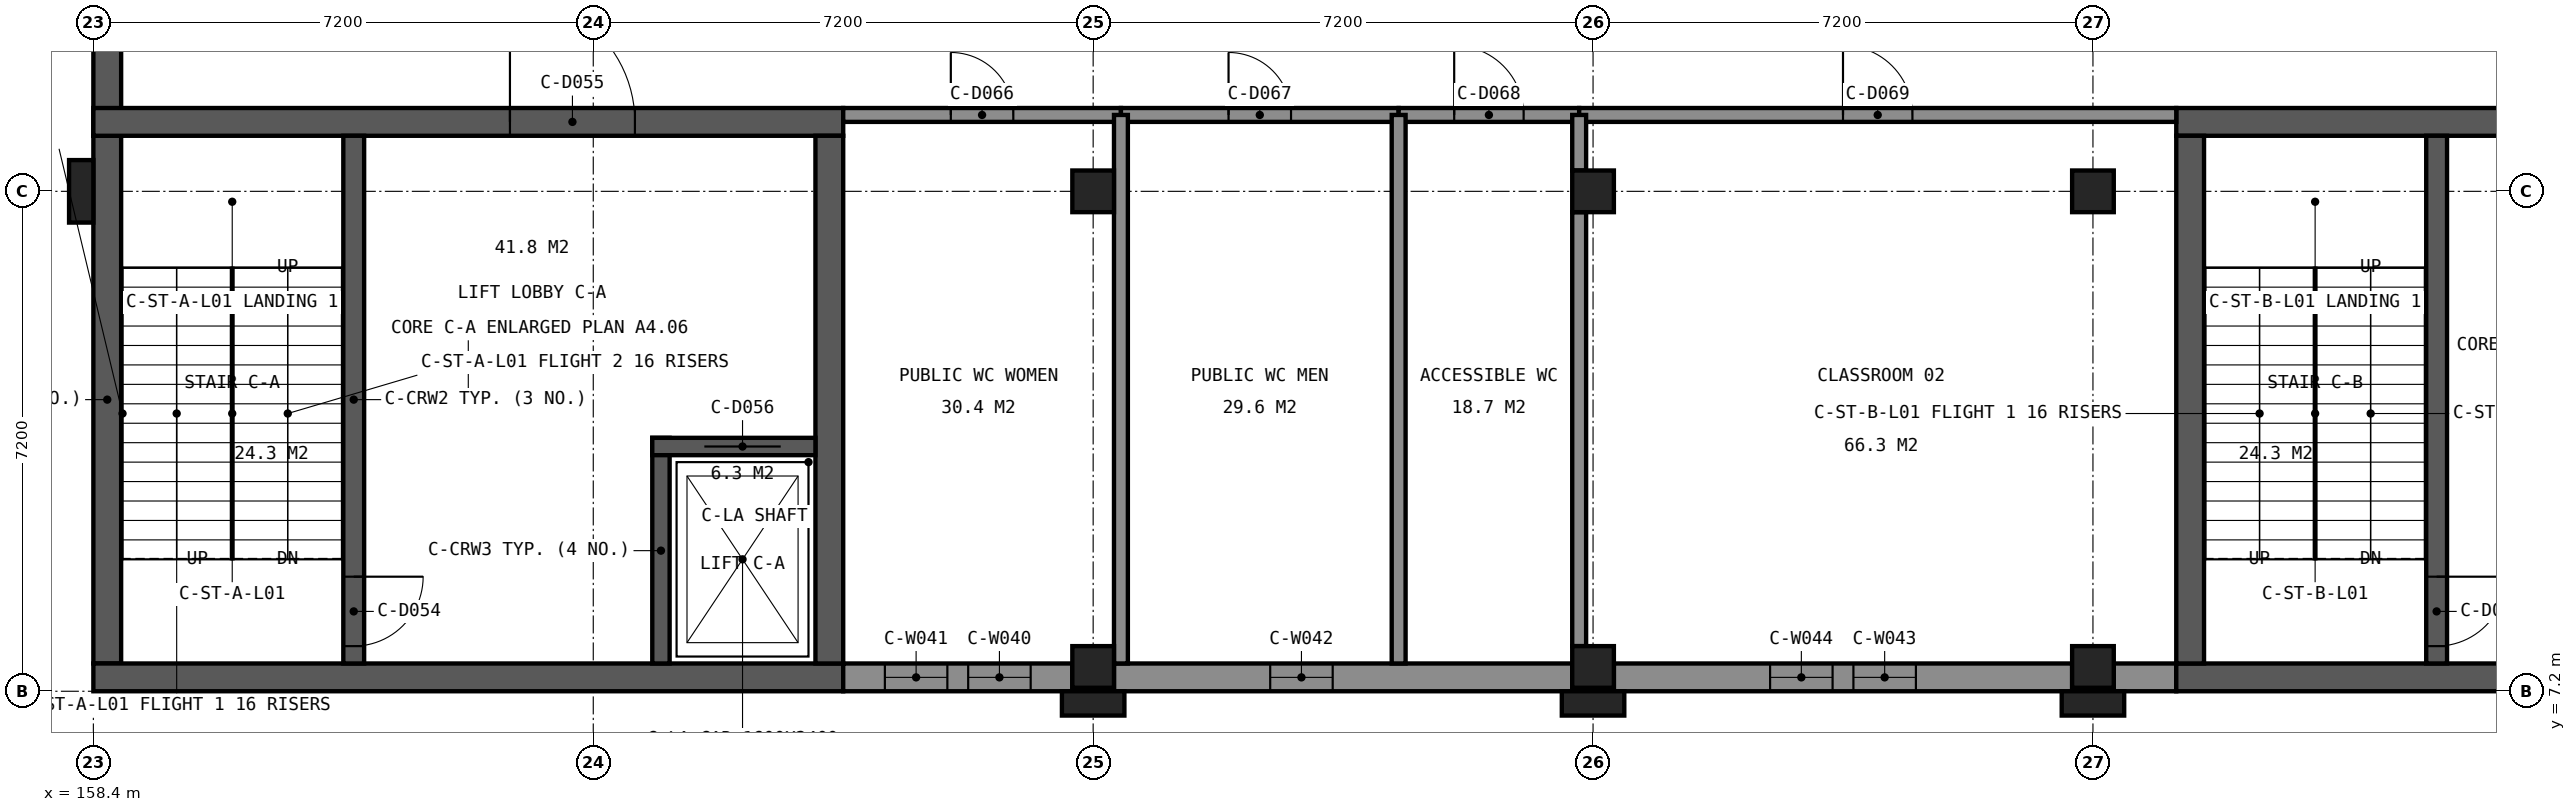
"""IFC4 building model, lengths in metres.
Left out: names, types, materials, properties, quantities, classifications, styles, units other than length and angle.
Written with IfcOpenShell. Run it as: python <this file> out.ifc"""

import sys

from ifc_helpers import new_model, si_unit, direction, frame, frame_2d, origin, origin_2d, place, context, subcontext, project, spatial, rectangle, extrude, element, fill, save


model = new_model("IFC4")
c1 = context("Model", 3, precision=1e-05, world=origin(), true_north=direction((0.0, 1.0)))
c2 = subcontext(c1, "Body", "Model", "MODEL_VIEW")
j1 = project(units=[si_unit("LENGTHUNIT", "METRE"), si_unit("PLANEANGLEUNIT", "RADIAN")], contexts=[c1])
p1 = place(None, origin())
s1 = spatial("IfcSite", under=j1, at=p1, CompositionType="ELEMENT")
p2 = place(p1, origin())
s2 = spatial("IfcBuilding", under=s1, at=p2, CompositionType="ELEMENT")
p3 = place(p2, frame((0.0, 0.0, 9.6)))
s3 = spatial("IfcBuildingStorey", under=s2, at=p3, CompositionType="ELEMENT", Elevation=9.6)
for number, where, z_axis, x_axis in (
    (1, (172.8, 14.4, 0.0), (0.0, 0.0, 1.0), (1.0, 0.0, 0.0)),
    (2, (180.0, 14.4, 0.0), (0.0, 0.0, 1.0), (1.0, 0.0, 0.0)),
    (3, (187.2, 14.4, 0.0), (0.0, 0.0, 1.0), (1.0, 0.0, 0.0)),
    (4, (172.8, 7.55, 0.0), (0.0, 0.0, 1.0), (1.0, 0.0, 0.0)),
    (5, (180.0, 7.55, 0.0), (0.0, 0.0, 1.0), (1.0, 0.0, 0.0)),
    (6, (187.2, 7.55, 0.0), (0.0, 0.0, 1.0), (1.0, 0.0, 0.0)),
):
    element("IfcColumn", number, at=place(p3, frame(where, z_axis=z_axis, x_axis=x_axis)), inside=s3, PredefinedType="COLUMN", context=c2, shape_type="SweptSolid", body=[
        extrude(rectangle(XDim=0.6, YDim=0.6, at=origin_2d()), origin(), (0.0, 0.0, 1.0), 4.8),
    ])
p4 = place(p3, frame((158.6, 15.2, 0.0), z_axis=(0.0, 0.0, 1.0), x_axis=(0.0, 1.0, 0.0)))
e7 = element("IfcWall", 7, at=p4, inside=s3, PredefinedType="SHEAR", context=c2, shape_type="SweptSolid", body=[
    extrude(rectangle(XDim=6.1, YDim=0.4, at=frame_2d((3.05, 0.0))), origin(), (0.0, 0.0, 1.0), 3.95),
])
p5 = place(p4, frame((2.0, 0.0, 0.9)))
e8 = element("IfcOpeningElement", 8, at=p5, cuts=e7, PredefinedType="OPENING", context=c2, shape_type="SweptSolid", body=[
    extrude(rectangle(XDim=0.9, YDim=2.7, at=frame_2d((0.45, 1.35))), frame((0.0, 0.21, 0.0), z_axis=(0.0, -1.0, 0.0), x_axis=(1.0, 0.0, 0.0)), (0.0, 0.0, 1.0), 0.42),
])
p6 = place(p3, frame((158.6, 7.6, 0.0), z_axis=(0.0, 0.0, 1.0), x_axis=(0.0, 1.0, 0.0)))
e9 = element("IfcWall", 9, at=p6, inside=s3, PredefinedType="SHEAR", context=c2, shape_type="SweptSolid", body=[
    extrude(rectangle(XDim=7.6, YDim=0.4, at=frame_2d((3.8, 0.0))), origin(), (0.0, 0.0, 1.0), 4.55),
])
p7 = place(p3, frame((169.2, 7.4, 0.0), z_axis=(0.0, 0.0, 1.0), x_axis=(-1.0, 0.0, 0.0)))
e10 = element("IfcWall", 10, at=p7, inside=s3, PredefinedType="SHEAR", context=c2, shape_type="SweptSolid", body=[
    extrude(rectangle(XDim=10.8, YDim=0.4, at=frame_2d((5.4, 0.0))), origin(), (0.0, 0.0, 1.0), 4.55),
])
p8 = place(p3, frame((172.5, 7.4, 0.0), z_axis=(0.0, 0.0, 1.0), x_axis=(-1.0, 0.0, 0.0)))
e11 = element("IfcWall", 11, at=p8, inside=s3, PredefinedType="SOLIDWALL", context=c2, shape_type="SweptSolid", body=[
    extrude(rectangle(XDim=3.3, YDim=0.4, at=frame_2d((1.65, 0.0))), origin(), (0.0, 0.0, 1.0), 3.95),
])
p9 = place(p8, frame((0.6, 0.0, 0.9)))
e12 = element("IfcOpeningElement", 12, at=p9, cuts=e11, PredefinedType="OPENING", context=c2, shape_type="SweptSolid", body=[
    extrude(rectangle(XDim=0.9, YDim=2.7, at=frame_2d((0.45, 1.35))), frame((0.0, 0.21, 0.0), z_axis=(0.0, -1.0, 0.0), x_axis=(1.0, 0.0, 0.0)), (0.0, 0.0, 1.0), 0.42),
])
p10 = place(p8, frame((1.8, 0.0, 0.9)))
e13 = element("IfcOpeningElement", 13, at=p10, cuts=e11, PredefinedType="OPENING", context=c2, shape_type="SweptSolid", body=[
    extrude(rectangle(XDim=0.9, YDim=2.7, at=frame_2d((0.45, 1.35))), frame((0.0, 0.21, 0.0), z_axis=(0.0, -1.0, 0.0), x_axis=(1.0, 0.0, 0.0)), (0.0, 0.0, 1.0), 0.42),
])
p11 = place(p3, frame((179.7, 7.4, 0.0), z_axis=(0.0, 0.0, 1.0), x_axis=(-1.0, 0.0, 0.0)))
e14 = element("IfcWall", 14, at=p11, inside=s3, PredefinedType="SOLIDWALL", context=c2, shape_type="SweptSolid", body=[
    extrude(rectangle(XDim=6.6, YDim=0.4, at=frame_2d((3.3, 0.0))), origin(), (0.0, 0.0, 1.0), 3.95),
])
p12 = place(p11, frame((3.45, 0.0, 0.9)))
e15 = element("IfcOpeningElement", 15, at=p12, cuts=e14, PredefinedType="OPENING", context=c2, shape_type="SweptSolid", body=[
    extrude(rectangle(XDim=0.9, YDim=2.7, at=frame_2d((0.45, 1.35))), frame((0.0, 0.21, 0.0), z_axis=(0.0, -1.0, 0.0), x_axis=(1.0, 0.0, 0.0)), (0.0, 0.0, 1.0), 0.42),
])
p13 = place(p3, frame((186.9, 7.4, 0.0), z_axis=(0.0, 0.0, 1.0), x_axis=(-1.0, 0.0, 0.0)))
e16 = element("IfcWall", 16, at=p13, inside=s3, PredefinedType="SOLIDWALL", context=c2, shape_type="SweptSolid", body=[
    extrude(rectangle(XDim=6.6, YDim=0.4, at=frame_2d((3.3, 0.0))), origin(), (0.0, 0.0, 1.0), 3.95),
])
p14 = place(p13, frame((2.25, 0.0, 0.9)))
e17 = element("IfcOpeningElement", 17, at=p14, cuts=e16, PredefinedType="OPENING", context=c2, shape_type="SweptSolid", body=[
    extrude(rectangle(XDim=0.9, YDim=2.7, at=frame_2d((0.45, 1.35))), frame((0.0, 0.21, 0.0), z_axis=(0.0, -1.0, 0.0), x_axis=(1.0, 0.0, 0.0)), (0.0, 0.0, 1.0), 0.42),
])
p15 = place(p13, frame((3.45, 0.0, 0.9)))
e18 = element("IfcOpeningElement", 18, at=p15, cuts=e16, PredefinedType="OPENING", context=c2, shape_type="SweptSolid", body=[
    extrude(rectangle(XDim=0.9, YDim=2.7, at=frame_2d((0.45, 1.35))), frame((0.0, 0.21, 0.0), z_axis=(0.0, -1.0, 0.0), x_axis=(1.0, 0.0, 0.0)), (0.0, 0.0, 1.0), 0.42),
])
p16 = place(p3, frame((188.4, 7.4, 0.0), z_axis=(0.0, 0.0, 1.0), x_axis=(-1.0, 0.0, 0.0)))
e19 = element("IfcWall", 19, at=p16, inside=s3, PredefinedType="SOLIDWALL", context=c2, shape_type="SweptSolid", body=[
    extrude(rectangle(XDim=0.9, YDim=0.4, at=frame_2d((0.45, 0.0))), origin(), (0.0, 0.0, 1.0), 3.95),
])
p17 = place(p3, frame((199.2, 7.4, 0.0), z_axis=(0.0, 0.0, 1.0), x_axis=(-1.0, 0.0, 0.0)))
e20 = element("IfcWall", 20, at=p17, inside=s3, PredefinedType="SHEAR", context=c2, shape_type="SweptSolid", body=[
    extrude(rectangle(XDim=10.8, YDim=0.4, at=frame_2d((5.4, 0.0))), origin(), (0.0, 0.0, 1.0), 4.55),
])
p18 = place(p3, frame((158.4, 15.4, 0.0), z_axis=(0.0, 0.0, 1.0), x_axis=(1.0, 0.0, 0.0)))
e21 = element("IfcWall", 21, at=p18, inside=s3, PredefinedType="SHEAR", context=c2, shape_type="SweptSolid", body=[
    extrude(rectangle(XDim=10.8, YDim=0.4, at=frame_2d((5.4, 0.0))), origin(), (0.0, 0.0, 1.0), 4.55),
])
p19 = place(p18, frame((6.0, 0.0, 0.0)))
e22 = element("IfcOpeningElement", 22, at=p19, cuts=e21, PredefinedType="OPENING", context=c2, shape_type="SweptSolid", body=[
    extrude(rectangle(XDim=1.8, YDim=2.1, at=frame_2d((0.9, 1.05))), frame((0.0, 0.21, 0.0), z_axis=(0.0, -1.0, 0.0), x_axis=(1.0, 0.0, 0.0)), (0.0, 0.0, 1.0), 0.42),
])
p20 = place(p3, frame((169.0, 15.2, 0.0), z_axis=(0.0, 0.0, 1.0), x_axis=(0.0, -1.0, 0.0)))
e23 = element("IfcWall", 23, at=p20, inside=s3, PredefinedType="SHEAR", context=c2, shape_type="SweptSolid", body=[
    extrude(rectangle(XDim=7.6, YDim=0.4, at=frame_2d((3.8, 0.0))), origin(), (0.0, 0.0, 1.0), 4.55),
])
p21 = place(p3, frame((162.15, 15.2, 0.0), z_axis=(0.0, 0.0, 1.0), x_axis=(0.0, -1.0, 0.0)))
e24 = element("IfcWall", 24, at=p21, inside=s3, PredefinedType="SHEAR", context=c2, shape_type="SweptSolid", body=[
    extrude(rectangle(XDim=7.6, YDim=0.3, at=frame_2d((3.8, 0.0))), origin(), (0.0, 0.0, 1.0), 4.55),
])
p22 = place(p21, frame((6.35, 0.0, 0.0)))
e25 = element("IfcOpeningElement", 25, at=p22, cuts=e24, PredefinedType="OPENING", context=c2, shape_type="SweptSolid", body=[
    extrude(rectangle(XDim=1.0, YDim=2.1, at=frame_2d((0.5, 1.05))), frame((0.0, 0.16, 0.0), z_axis=(0.0, -1.0, 0.0), x_axis=(1.0, 0.0, 0.0)), (0.0, 0.0, 1.0), 0.32),
])
p23 = place(p3, frame((166.575, 10.85, 0.0), z_axis=(0.0, 0.0, 1.0), x_axis=(0.0, -1.0, 0.0)))
e26 = element("IfcWall", 26, at=p23, inside=s3, PredefinedType="SHEAR", context=c2, shape_type="SweptSolid", body=[
    extrude(rectangle(XDim=3.25, YDim=0.25, at=frame_2d((1.625, 0.0))), origin(), (0.0, 0.0, 1.0), 4.55),
])
p24 = place(p3, frame((166.45, 10.725, 0.0), z_axis=(0.0, 0.0, 1.0), x_axis=(1.0, 0.0, 0.0)))
e27 = element("IfcWall", 27, at=p24, inside=s3, PredefinedType="SHEAR", context=c2, shape_type="SweptSolid", body=[
    extrude(rectangle(XDim=2.35, YDim=0.25, at=frame_2d((1.175, 0.0))), origin(), (0.0, 0.0, 1.0), 4.55),
])
p25 = place(p24, frame((0.75, 0.0, 0.0)))
e28 = element("IfcOpeningElement", 28, at=p25, cuts=e27, PredefinedType="OPENING", context=c2, shape_type="SweptSolid", body=[
    extrude(rectangle(XDim=1.1, YDim=2.1, at=frame_2d((0.55, 1.05))), frame((0.0, 0.135, 0.0), z_axis=(0.0, -1.0, 0.0), x_axis=(1.0, 0.0, 0.0)), (0.0, 0.0, 1.0), 0.27),
])
p26 = place(p3, frame((188.4, 15.4, 0.0), z_axis=(0.0, 0.0, 1.0), x_axis=(1.0, 0.0, 0.0)))
e29 = element("IfcWall", 29, at=p26, inside=s3, PredefinedType="SHEAR", context=c2, shape_type="SweptSolid", body=[
    extrude(rectangle(XDim=10.8, YDim=0.4, at=frame_2d((5.4, 0.0))), origin(), (0.0, 0.0, 1.0), 4.55),
])
p27 = place(p26, frame((6.0, 0.0, 0.0)))
e30 = element("IfcOpeningElement", 30, at=p27, cuts=e29, PredefinedType="OPENING", context=c2, shape_type="SweptSolid", body=[
    extrude(rectangle(XDim=1.8, YDim=2.1, at=frame_2d((0.9, 1.05))), frame((0.0, 0.21, 0.0), z_axis=(0.0, -1.0, 0.0), x_axis=(1.0, 0.0, 0.0)), (0.0, 0.0, 1.0), 0.42),
])
p28 = place(p3, frame((188.6, 15.2, 0.0), z_axis=(0.0, 0.0, 1.0), x_axis=(0.0, -1.0, 0.0)))
e31 = element("IfcWall", 31, at=p28, inside=s3, PredefinedType="SHEAR", context=c2, shape_type="SweptSolid", body=[
    extrude(rectangle(XDim=7.6, YDim=0.4, at=frame_2d((3.8, 0.0))), origin(), (0.0, 0.0, 1.0), 4.55),
])
p29 = place(p3, frame((192.15, 15.2, 0.0), z_axis=(0.0, 0.0, 1.0), x_axis=(0.0, -1.0, 0.0)))
e32 = element("IfcWall", 32, at=p29, inside=s3, PredefinedType="SHEAR", context=c2, shape_type="SweptSolid", body=[
    extrude(rectangle(XDim=7.6, YDim=0.3, at=frame_2d((3.8, 0.0))), origin(), (0.0, 0.0, 1.0), 4.55),
])
p30 = place(p29, frame((6.35, 0.0, 0.0)))
e33 = element("IfcOpeningElement", 33, at=p30, cuts=e32, PredefinedType="OPENING", context=c2, shape_type="SweptSolid", body=[
    extrude(rectangle(XDim=1.0, YDim=2.1, at=frame_2d((0.5, 1.05))), frame((0.0, 0.16, 0.0), z_axis=(0.0, -1.0, 0.0), x_axis=(1.0, 0.0, 0.0)), (0.0, 0.0, 1.0), 0.32),
])
for number, where, z_axis, x_axis in (
    (34, (172.8, 7.025, 0.0), (0.0, 0.0, 1.0), (1.0, 0.0, 0.0)),
    (35, (180.0, 7.025, 0.0), (0.0, 0.0, 1.0), (1.0, 0.0, 0.0)),
    (36, (187.2, 7.025, 0.0), (0.0, 0.0, 1.0), (1.0, 0.0, 0.0)),
    (37, (158.225, 14.4, 0.0), (0.0, 0.0, 1.0), (0.0, 1.0, 0.0)),
):
    element("IfcColumn", number, at=place(p3, frame(where, z_axis=z_axis, x_axis=x_axis)), inside=s3, PredefinedType="PILASTER", context=c2, shape_type="SweptSolid", body=[
        extrude(rectangle(XDim=0.9, YDim=0.35, at=origin_2d()), origin(), (0.0, 0.0, 1.0), 4.8),
    ])
p31 = place(p3, frame((169.2, 15.5, 0.0), z_axis=(0.0, 0.0, 1.0), x_axis=(1.0, 0.0, 0.0)))
e38 = element("IfcWall", 38, at=p31, inside=s3, PredefinedType="PARTITIONING", context=c2, shape_type="SweptSolid", body=[
    extrude(rectangle(XDim=4.0, YDim=0.2, at=frame_2d((2.0, 0.0))), origin(), (0.0, 0.0, 1.0), 3.95),
])
p32 = place(p31, frame((1.55, 0.0, 0.0)))
e39 = element("IfcOpeningElement", 39, at=p32, cuts=e38, PredefinedType="OPENING", context=c2, shape_type="SweptSolid", body=[
    extrude(rectangle(XDim=0.9, YDim=2.1, at=frame_2d((0.45, 1.05))), frame((0.0, 0.11, 0.0), z_axis=(0.0, -1.0, 0.0), x_axis=(1.0, 0.0, 0.0)), (0.0, 0.0, 1.0), 0.22),
])
p33 = place(p3, frame((173.2, 15.5, 0.0), z_axis=(0.0, 0.0, 1.0), x_axis=(1.0, 0.0, 0.0)))
e40 = element("IfcWall", 40, at=p33, inside=s3, PredefinedType="PARTITIONING", context=c2, shape_type="SweptSolid", body=[
    extrude(rectangle(XDim=4.0, YDim=0.2, at=frame_2d((2.0, 0.0))), origin(), (0.0, 0.0, 1.0), 3.95),
])
p34 = place(p33, frame((1.55, 0.0, 0.0)))
e41 = element("IfcOpeningElement", 41, at=p34, cuts=e40, PredefinedType="OPENING", context=c2, shape_type="SweptSolid", body=[
    extrude(rectangle(XDim=0.9, YDim=2.1, at=frame_2d((0.45, 1.05))), frame((0.0, 0.11, 0.0), z_axis=(0.0, -1.0, 0.0), x_axis=(1.0, 0.0, 0.0)), (0.0, 0.0, 1.0), 0.22),
])
p35 = place(p3, frame((177.2, 15.5, 0.0), z_axis=(0.0, 0.0, 1.0), x_axis=(1.0, 0.0, 0.0)))
e42 = element("IfcWall", 42, at=p35, inside=s3, PredefinedType="PARTITIONING", context=c2, shape_type="SweptSolid", body=[
    extrude(rectangle(XDim=2.6, YDim=0.2, at=frame_2d((1.3, 0.0))), origin(), (0.0, 0.0, 1.0), 3.95),
])
p36 = place(p35, frame((0.8, 0.0, 0.0)))
e43 = element("IfcOpeningElement", 43, at=p36, cuts=e42, PredefinedType="OPENING", context=c2, shape_type="SweptSolid", body=[
    extrude(rectangle(XDim=1.0, YDim=2.1, at=frame_2d((0.5, 1.05))), frame((0.0, 0.11, 0.0), z_axis=(0.0, -1.0, 0.0), x_axis=(1.0, 0.0, 0.0)), (0.0, 0.0, 1.0), 0.22),
])
p37 = place(p3, frame((179.8, 15.5, 0.0), z_axis=(0.0, 0.0, 1.0), x_axis=(1.0, 0.0, 0.0)))
e44 = element("IfcWall", 44, at=p37, inside=s3, PredefinedType="PARTITIONING", context=c2, shape_type="SweptSolid", body=[
    extrude(rectangle(XDim=8.6, YDim=0.2, at=frame_2d((4.3, 0.0))), origin(), (0.0, 0.0, 1.0), 3.95),
])
p38 = place(p37, frame((3.8, 0.0, 0.0)))
e45 = element("IfcOpeningElement", 45, at=p38, cuts=e44, PredefinedType="OPENING", context=c2, shape_type="SweptSolid", body=[
    extrude(rectangle(XDim=1.0, YDim=2.1, at=frame_2d((0.5, 1.05))), frame((0.0, 0.11, 0.0), z_axis=(0.0, -1.0, 0.0), x_axis=(1.0, 0.0, 0.0)), (0.0, 0.0, 1.0), 0.22),
])
for number, where, z_axis, x_axis in (
    (46, (173.2, 15.5, 0.0), (0.0, 0.0, 1.0), (0.0, -1.0, 0.0)),
    (47, (177.2, 15.5, 0.0), (0.0, 0.0, 1.0), (0.0, -1.0, 0.0)),
):
    element("IfcWall", number, at=place(p3, frame(where, z_axis=z_axis, x_axis=x_axis)), inside=s3, PredefinedType="PARTITIONING", context=c2, shape_type="SweptSolid", body=[
        extrude(rectangle(XDim=7.9, YDim=0.2, at=frame_2d((3.95, 0.0))), origin(), (0.0, 0.0, 1.0), 3.95),
    ])
p39 = place(p3, frame((179.8, 15.5, 0.0), z_axis=(0.0, 0.0, 1.0), x_axis=(0.0, -1.0, 0.0)))
e48 = element("IfcWall", 48, at=p39, inside=s3, PredefinedType="PARTITIONING", context=c2, shape_type="SweptSolid", body=[
    extrude(rectangle(XDim=0.8, YDim=0.2, at=frame_2d((0.4, 0.0))), origin(), (0.0, 0.0, 1.0), 3.95),
])
p40 = place(p3, frame((179.8, 14.1, 0.0), z_axis=(0.0, 0.0, 1.0), x_axis=(0.0, -1.0, 0.0)))
e49 = element("IfcWall", 49, at=p40, inside=s3, PredefinedType="PARTITIONING", context=c2, shape_type="SweptSolid", body=[
    extrude(rectangle(XDim=6.25, YDim=0.2, at=frame_2d((3.125, 0.0))), origin(), (0.0, 0.0, 1.0), 3.95),
])
p41 = place(p9, origin())
e50 = element("IfcWindow", 50, at=p41, inside=s3, PartitioningType="SINGLE_PANEL", PredefinedType="WINDOW", context=c2, shape_type="SweptSolid", body=[
    extrude(rectangle(XDim=0.9, YDim=2.7, at=frame_2d((0.45, 1.35))), frame((0.0, -0.09, 0.0), z_axis=(0.0, -1.0, 0.0), x_axis=(1.0, 0.0, 0.0)), (0.0, 0.0, 1.0), 0.06),
])
fill(e12, e50)
p42 = place(p10, origin())
e51 = element("IfcWindow", 51, at=p42, inside=s3, PartitioningType="SINGLE_PANEL", PredefinedType="WINDOW", context=c2, shape_type="SweptSolid", body=[
    extrude(rectangle(XDim=0.9, YDim=2.7, at=frame_2d((0.45, 1.35))), frame((0.0, -0.09, 0.0), z_axis=(0.0, -1.0, 0.0), x_axis=(1.0, 0.0, 0.0)), (0.0, 0.0, 1.0), 0.06),
])
fill(e13, e51)
p43 = place(p12, origin())
e52 = element("IfcWindow", 52, at=p43, inside=s3, PartitioningType="SINGLE_PANEL", PredefinedType="WINDOW", context=c2, shape_type="SweptSolid", body=[
    extrude(rectangle(XDim=0.9, YDim=2.7, at=frame_2d((0.45, 1.35))), frame((0.0, -0.09, 0.0), z_axis=(0.0, -1.0, 0.0), x_axis=(1.0, 0.0, 0.0)), (0.0, 0.0, 1.0), 0.06),
])
fill(e15, e52)
p44 = place(p14, origin())
e53 = element("IfcWindow", 53, at=p44, inside=s3, PartitioningType="SINGLE_PANEL", PredefinedType="WINDOW", context=c2, shape_type="SweptSolid", body=[
    extrude(rectangle(XDim=0.9, YDim=2.7, at=frame_2d((0.45, 1.35))), frame((0.0, -0.09, 0.0), z_axis=(0.0, -1.0, 0.0), x_axis=(1.0, 0.0, 0.0)), (0.0, 0.0, 1.0), 0.06),
])
fill(e17, e53)
p45 = place(p15, origin())
e54 = element("IfcWindow", 54, at=p45, inside=s3, PartitioningType="SINGLE_PANEL", PredefinedType="WINDOW", context=c2, shape_type="SweptSolid", body=[
    extrude(rectangle(XDim=0.9, YDim=2.7, at=frame_2d((0.45, 1.35))), frame((0.0, -0.09, 0.0), z_axis=(0.0, -1.0, 0.0), x_axis=(1.0, 0.0, 0.0)), (0.0, 0.0, 1.0), 0.06),
])
fill(e18, e54)
p46 = place(p22, origin())
e55 = element("IfcDoor", 55, at=p46, inside=s3, OperationType="NOTDEFINED", PredefinedType="DOOR", context=c2, shape_type="SweptSolid", body=[
    extrude(rectangle(XDim=1.0, YDim=2.1, at=frame_2d((0.5, 1.05))), frame((0.0, 0.025, 0.0), z_axis=(0.0, -1.0, 0.0), x_axis=(1.0, 0.0, 0.0)), (0.0, 0.0, 1.0), 0.05),
])
fill(e25, e55)
p47 = place(p19, origin())
e56 = element("IfcDoor", 56, at=p47, inside=s3, OperationType="NOTDEFINED", PredefinedType="DOOR", context=c2, shape_type="SweptSolid", body=[
    extrude(rectangle(XDim=1.8, YDim=2.1, at=frame_2d((0.9, 1.05))), frame((0.0, 0.025, 0.0), z_axis=(0.0, -1.0, 0.0), x_axis=(1.0, 0.0, 0.0)), (0.0, 0.0, 1.0), 0.05),
])
fill(e22, e56)
p48 = place(p25, origin())
e57 = element("IfcDoor", 57, at=p48, inside=s3, OperationType="SLIDING_TO_LEFT", PredefinedType="DOOR", context=c2, shape_type="SweptSolid", body=[
    extrude(rectangle(XDim=1.1, YDim=2.1, at=frame_2d((0.55, 1.05))), frame((0.0, 0.025, 0.0), z_axis=(0.0, -1.0, 0.0), x_axis=(1.0, 0.0, 0.0)), (0.0, 0.0, 1.0), 0.05),
])
fill(e28, e57)
p49 = place(p30, origin())
e58 = element("IfcDoor", 58, at=p49, inside=s3, OperationType="NOTDEFINED", PredefinedType="DOOR", context=c2, shape_type="SweptSolid", body=[
    extrude(rectangle(XDim=1.0, YDim=2.1, at=frame_2d((0.5, 1.05))), frame((0.0, 0.025, 0.0), z_axis=(0.0, -1.0, 0.0), x_axis=(1.0, 0.0, 0.0)), (0.0, 0.0, 1.0), 0.05),
])
fill(e33, e58)
p50 = place(p32, origin())
e59 = element("IfcDoor", 59, at=p50, inside=s3, OperationType="NOTDEFINED", PredefinedType="DOOR", context=c2, shape_type="SweptSolid", body=[
    extrude(rectangle(XDim=0.9, YDim=2.1, at=frame_2d((0.45, 1.05))), frame((0.0, 0.025, 0.0), z_axis=(0.0, -1.0, 0.0), x_axis=(1.0, 0.0, 0.0)), (0.0, 0.0, 1.0), 0.05),
])
fill(e39, e59)
p51 = place(p34, origin())
e60 = element("IfcDoor", 60, at=p51, inside=s3, OperationType="NOTDEFINED", PredefinedType="DOOR", context=c2, shape_type="SweptSolid", body=[
    extrude(rectangle(XDim=0.9, YDim=2.1, at=frame_2d((0.45, 1.05))), frame((0.0, 0.025, 0.0), z_axis=(0.0, -1.0, 0.0), x_axis=(1.0, 0.0, 0.0)), (0.0, 0.0, 1.0), 0.05),
])
fill(e41, e60)
p52 = place(p36, origin())
e61 = element("IfcDoor", 61, at=p52, inside=s3, OperationType="NOTDEFINED", PredefinedType="DOOR", context=c2, shape_type="SweptSolid", body=[
    extrude(rectangle(XDim=1.0, YDim=2.1, at=frame_2d((0.5, 1.05))), frame((0.0, 0.025, 0.0), z_axis=(0.0, -1.0, 0.0), x_axis=(1.0, 0.0, 0.0)), (0.0, 0.0, 1.0), 0.05),
])
fill(e43, e61)
p53 = place(p38, origin())
e62 = element("IfcDoor", 62, at=p53, inside=s3, OperationType="NOTDEFINED", PredefinedType="DOOR", context=c2, shape_type="SweptSolid", body=[
    extrude(rectangle(XDim=1.0, YDim=2.1, at=frame_2d((0.5, 1.05))), frame((0.0, 0.025, 0.0), z_axis=(0.0, -1.0, 0.0), x_axis=(1.0, 0.0, 0.0)), (0.0, 0.0, 1.0), 0.05),
])
fill(e45, e62)
save(model, sys.argv[1])
